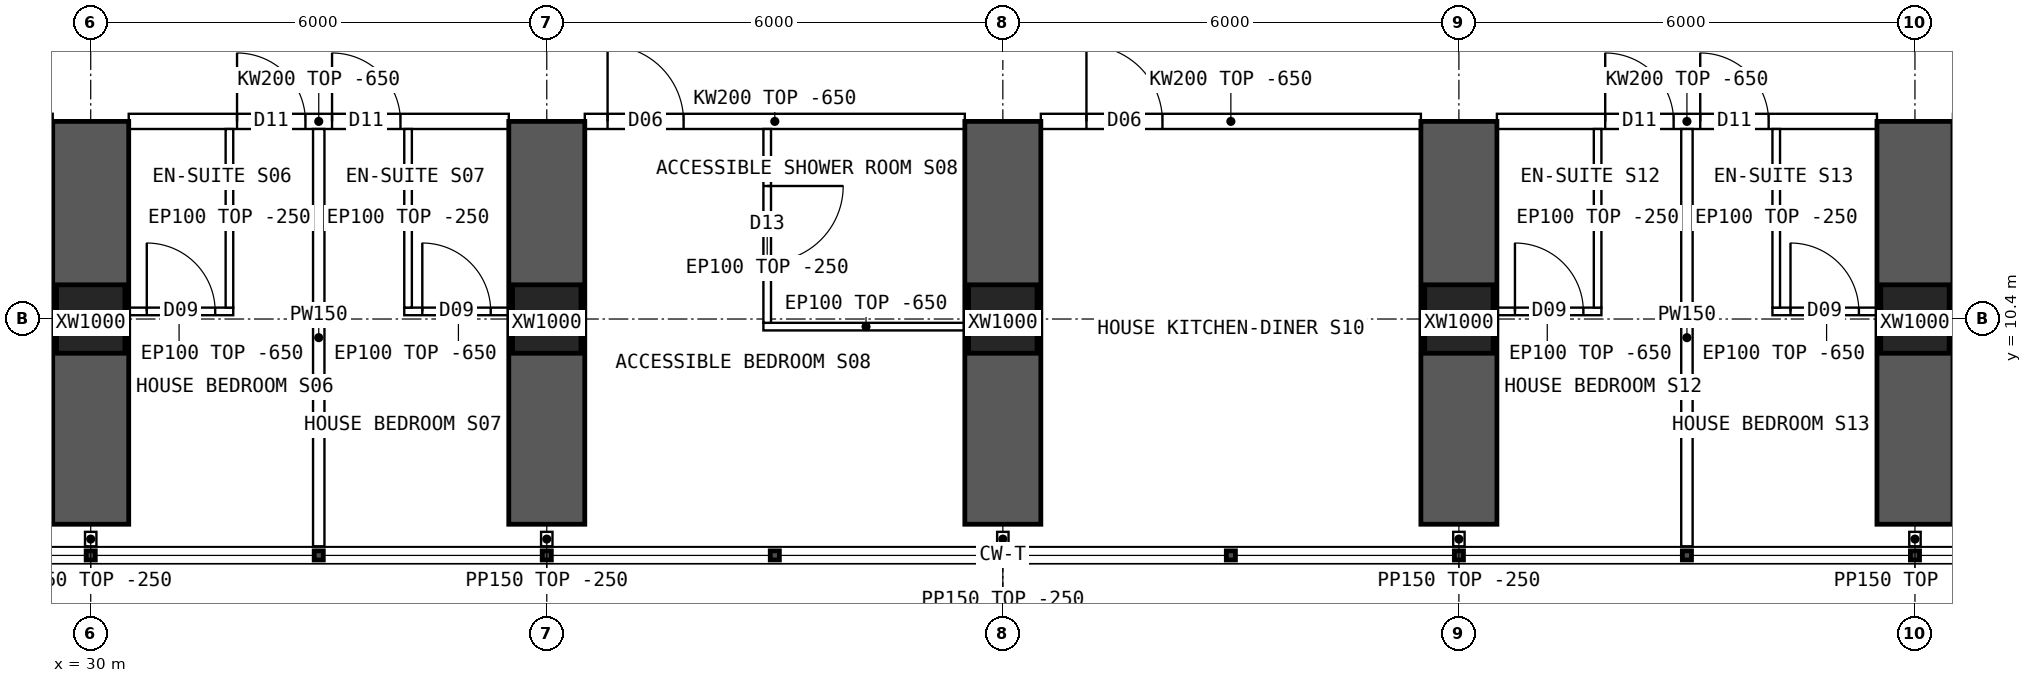
"""IFC4 building model, lengths in metres.
Left out: names, types, materials, properties, quantities, classifications, styles, units other than length and angle.
Written with IfcOpenShell. Run it as: python <this file> out.ifc"""

import sys

from ifc_helpers import new_model, si_unit, direction, frame, frame_2d, origin, origin_2d, place, context, subcontext, project, spatial, polyline, rectangle, hollow_rectangle, outline, extrude, element, fill, save


model = new_model("IFC4")
c1 = context("Model", 3, precision=1e-05, world=origin(), true_north=direction((0.0, 1.0)))
c2 = subcontext(c1, "Body", "Model", "MODEL_VIEW")
j1 = project(units=[si_unit("LENGTHUNIT", "METRE"), si_unit("PLANEANGLEUNIT", "RADIAN")], contexts=[c1])
p1 = place(None, origin())
s1 = spatial("IfcSite", under=j1, at=p1, CompositionType="ELEMENT")
p2 = place(p1, origin())
s2 = spatial("IfcBuilding", under=s1, at=p2, CompositionType="ELEMENT")
p3 = place(p2, frame((0.0, 0.0, 27.7)))
s3 = spatial("IfcBuildingStorey", under=s2, at=p3, CompositionType="ELEMENT", Elevation=27.7)
for number, where, z_axis, x_axis in (
    (1, (30.0, 10.4, 0.0), (0.0, 0.0, 1.0), (1.0, 0.0, 0.0)),
    (2, (36.0, 10.4, 0.0), (0.0, 0.0, 1.0), (1.0, 0.0, 0.0)),
    (3, (42.0, 10.4, 0.0), (0.0, 0.0, 1.0), (1.0, 0.0, 0.0)),
    (4, (48.0, 10.4, 0.0), (0.0, 0.0, 1.0), (1.0, 0.0, 0.0)),
    (5, (54.0, 10.4, 0.0), (0.0, 0.0, 1.0), (1.0, 0.0, 0.0)),
):
    element("IfcColumn", number, at=place(p3, frame(where, z_axis=z_axis, x_axis=x_axis)), inside=s3, PredefinedType="COLUMN", context=c2, shape_type="SweptSolid", body=[
        extrude(hollow_rectangle(XDim=0.9, YDim=0.9, WallThickness=0.09, at=origin_2d()), origin(), (0.0, 0.0, 1.0), 3.75),
    ])
for number, where, z_axis, x_axis in (
    (6, (30.0, 7.7, 0.0), (0.0, 0.0, 1.0), (0.0, 1.0, 0.0)),
    (7, (36.0, 7.7, 0.0), (0.0, 0.0, 1.0), (0.0, 1.0, 0.0)),
    (8, (42.0, 7.7, 0.0), (0.0, 0.0, 1.0), (0.0, 1.0, 0.0)),
    (9, (48.0, 7.7, 0.0), (0.0, 0.0, 1.0), (0.0, 1.0, 0.0)),
    (10, (54.0, 7.7, 0.0), (0.0, 0.0, 1.0), (0.0, 1.0, 0.0)),
):
    element("IfcWall", number, at=place(p3, frame(where, z_axis=z_axis, x_axis=x_axis)), inside=s3, PredefinedType="SHEAR", context=c2, shape_type="SweptSolid", body=[
        extrude(rectangle(XDim=5.3, YDim=1.0, at=frame_2d((2.65, 0.0))), origin(), (0.0, 0.0, 1.0), 3.75),
    ])
p4 = place(p3, frame((30.5, 13.0, 0.0), z_axis=(0.0, 0.0, 1.0), x_axis=(1.0, 0.0, 0.0)))
e11 = element("IfcWall", 11, at=p4, inside=s3, PredefinedType="SOLIDWALL", context=c2, shape_type="SweptSolid", body=[
    extrude(outline(polyline([(0.0, 0.0), (5.0, 0.0), (5.0, 3.1), (0.0, 3.1), (0.0, 0.0)])), frame((0.0, 0.1, 0.0), z_axis=(0.0, -1.0, 0.0), x_axis=(1.0, 0.0, 0.0)), (0.0, 0.0, 1.0), 0.2),
])
p5 = place(p4, frame((1.425, 0.0, 0.0)))
e12 = element("IfcOpeningElement", 12, at=p5, cuts=e11, PredefinedType="OPENING", context=c2, shape_type="SweptSolid", body=[
    extrude(rectangle(XDim=0.9, YDim=2.1, at=frame_2d((0.45, 1.05))), frame((0.0, 0.11, 0.0), z_axis=(0.0, -1.0, 0.0), x_axis=(1.0, 0.0, 0.0)), (0.0, 0.0, 1.0), 0.22),
])
p6 = place(p4, frame((2.675, 0.0, 0.0)))
e13 = element("IfcOpeningElement", 13, at=p6, cuts=e11, PredefinedType="OPENING", context=c2, shape_type="SweptSolid", body=[
    extrude(rectangle(XDim=0.9, YDim=2.1, at=frame_2d((0.45, 1.05))), frame((0.0, 0.11, 0.0), z_axis=(0.0, -1.0, 0.0), x_axis=(1.0, 0.0, 0.0)), (0.0, 0.0, 1.0), 0.22),
])
p7 = place(p3, frame((36.5, 13.0, 0.0), z_axis=(0.0, 0.0, 1.0), x_axis=(1.0, 0.0, 0.0)))
e14 = element("IfcWall", 14, at=p7, inside=s3, PredefinedType="SOLIDWALL", context=c2, shape_type="SweptSolid", body=[
    extrude(outline(polyline([(0.0, 0.0), (5.0, 0.0), (5.0, 3.1), (0.0, 3.1), (0.0, 0.0)])), frame((0.0, 0.1, 0.0), z_axis=(0.0, -1.0, 0.0), x_axis=(1.0, 0.0, 0.0)), (0.0, 0.0, 1.0), 0.2),
])
p8 = place(p7, frame((0.3, 0.0, 0.0)))
e15 = element("IfcOpeningElement", 15, at=p8, cuts=e14, PredefinedType="OPENING", context=c2, shape_type="SweptSolid", body=[
    extrude(rectangle(XDim=1.0, YDim=2.1, at=frame_2d((0.5, 1.05))), frame((0.0, 0.11, 0.0), z_axis=(0.0, -1.0, 0.0), x_axis=(1.0, 0.0, 0.0)), (0.0, 0.0, 1.0), 0.22),
])
p9 = place(p3, frame((42.5, 13.0, 0.0), z_axis=(0.0, 0.0, 1.0), x_axis=(1.0, 0.0, 0.0)))
e16 = element("IfcWall", 16, at=p9, inside=s3, PredefinedType="SOLIDWALL", context=c2, shape_type="SweptSolid", body=[
    extrude(outline(polyline([(0.0, 0.0), (5.0, 0.0), (5.0, 3.1), (0.0, 3.1), (0.0, 0.0)])), frame((0.0, 0.1, 0.0), z_axis=(0.0, -1.0, 0.0), x_axis=(1.0, 0.0, 0.0)), (0.0, 0.0, 1.0), 0.2),
])
p10 = place(p9, frame((0.6, 0.0, 0.0)))
e17 = element("IfcOpeningElement", 17, at=p10, cuts=e16, PredefinedType="OPENING", context=c2, shape_type="SweptSolid", body=[
    extrude(rectangle(XDim=1.0, YDim=2.1, at=frame_2d((0.5, 1.05))), frame((0.0, 0.11, 0.0), z_axis=(0.0, -1.0, 0.0), x_axis=(1.0, 0.0, 0.0)), (0.0, 0.0, 1.0), 0.22),
])
p11 = place(p3, frame((48.5, 13.0, 0.0), z_axis=(0.0, 0.0, 1.0), x_axis=(1.0, 0.0, 0.0)))
e18 = element("IfcWall", 18, at=p11, inside=s3, PredefinedType="SOLIDWALL", context=c2, shape_type="SweptSolid", body=[
    extrude(outline(polyline([(0.0, 0.0), (5.0, 0.0), (5.0, 3.1), (0.0, 3.1), (0.0, 0.0)])), frame((0.0, 0.1, 0.0), z_axis=(0.0, -1.0, 0.0), x_axis=(1.0, 0.0, 0.0)), (0.0, 0.0, 1.0), 0.2),
])
p12 = place(p11, frame((1.425, 0.0, 0.0)))
e19 = element("IfcOpeningElement", 19, at=p12, cuts=e18, PredefinedType="OPENING", context=c2, shape_type="SweptSolid", body=[
    extrude(rectangle(XDim=0.9, YDim=2.1, at=frame_2d((0.45, 1.05))), frame((0.0, 0.11, 0.0), z_axis=(0.0, -1.0, 0.0), x_axis=(1.0, 0.0, 0.0)), (0.0, 0.0, 1.0), 0.22),
])
p13 = place(p11, frame((2.675, 0.0, 0.0)))
e20 = element("IfcOpeningElement", 20, at=p13, cuts=e18, PredefinedType="OPENING", context=c2, shape_type="SweptSolid", body=[
    extrude(rectangle(XDim=0.9, YDim=2.1, at=frame_2d((0.45, 1.05))), frame((0.0, 0.11, 0.0), z_axis=(0.0, -1.0, 0.0), x_axis=(1.0, 0.0, 0.0)), (0.0, 0.0, 1.0), 0.22),
])
p14 = place(p3, frame((33.0, 7.41, 0.0), z_axis=(0.0, 0.0, 1.0), x_axis=(0.0, 1.0, 0.0)))
e21 = element("IfcWall", 21, at=p14, inside=s3, PredefinedType="PARTITIONING", context=c2, shape_type="SweptSolid", body=[
    extrude(outline(polyline([(0.0, 0.0), (5.49, 0.0), (5.49, 3.1), (5.442, 3.1), (5.44, 3.5), (3.192, 3.5), (3.19, 3.1), (2.792, 3.1), (2.79, 3.5), (0.0, 3.5), (0.0, 0.0)])), frame((0.0, 0.075, 0.0), z_axis=(0.0, -1.0, 0.0), x_axis=(1.0, 0.0, 0.0)), (0.0, 0.0, 1.0), 0.15),
])
p15 = place(p3, frame((31.875, 10.5, 0.0), z_axis=(0.0, 0.0, 1.0), x_axis=(-1.0, 0.0, 0.0)))
e22 = element("IfcWall", 22, at=p15, inside=s3, PredefinedType="PARTITIONING", context=c2, shape_type="SweptSolid", body=[
    extrude(outline(polyline([(0.0, 0.0), (1.425, 0.0), (1.425, 3.1), (0.0, 3.1), (0.0, 0.0)])), frame((0.0, 0.05, 0.0), z_axis=(0.0, -1.0, 0.0), x_axis=(1.0, 0.0, 0.0)), (0.0, 0.0, 1.0), 0.1),
])
p16 = place(p15, frame((0.238, 0.0, 0.0)))
e23 = element("IfcOpeningElement", 23, at=p16, cuts=e22, PredefinedType="OPENING", context=c2, shape_type="SweptSolid", body=[
    extrude(rectangle(XDim=0.9, YDim=2.1, at=frame_2d((0.45, 1.05))), frame((0.0, 0.06, 0.0), z_axis=(0.0, -1.0, 0.0), x_axis=(1.0, 0.0, 0.0)), (0.0, 0.0, 1.0), 0.12),
])
p17 = place(p3, frame((31.825, 10.55, 0.0), z_axis=(0.0, 0.0, 1.0), x_axis=(0.0, 1.0, 0.0)))
e24 = element("IfcWall", 24, at=p17, inside=s3, PredefinedType="PARTITIONING", context=c2, shape_type="SweptSolid", body=[
    extrude(outline(polyline([(0.0, 0.0), (2.35, 0.0), (2.35, 3.1), (2.302, 3.1), (2.3, 3.5), (0.052, 3.5), (0.05, 3.1), (0.0, 3.1), (0.0, 0.0)])), frame((0.0, 0.05, 0.0), z_axis=(0.0, -1.0, 0.0), x_axis=(1.0, 0.0, 0.0)), (0.0, 0.0, 1.0), 0.1),
])
p18 = place(p3, frame((35.55, 10.5, 0.0), z_axis=(0.0, 0.0, 1.0), x_axis=(-1.0, 0.0, 0.0)))
e25 = element("IfcWall", 25, at=p18, inside=s3, PredefinedType="PARTITIONING", context=c2, shape_type="SweptSolid", body=[
    extrude(outline(polyline([(0.0, 0.0), (1.425, 0.0), (1.425, 3.1), (0.0, 3.1), (0.0, 0.0)])), frame((0.0, 0.05, 0.0), z_axis=(0.0, -1.0, 0.0), x_axis=(1.0, 0.0, 0.0)), (0.0, 0.0, 1.0), 0.1),
])
p19 = place(p18, frame((0.288, 0.0, 0.0)))
e26 = element("IfcOpeningElement", 26, at=p19, cuts=e25, PredefinedType="OPENING", context=c2, shape_type="SweptSolid", body=[
    extrude(rectangle(XDim=0.9, YDim=2.1, at=frame_2d((0.45, 1.05))), frame((0.0, 0.06, 0.0), z_axis=(0.0, -1.0, 0.0), x_axis=(1.0, 0.0, 0.0)), (0.0, 0.0, 1.0), 0.12),
])
p20 = place(p3, frame((34.175, 10.55, 0.0), z_axis=(0.0, 0.0, 1.0), x_axis=(0.0, 1.0, 0.0)))
e27 = element("IfcWall", 27, at=p20, inside=s3, PredefinedType="PARTITIONING", context=c2, shape_type="SweptSolid", body=[
    extrude(outline(polyline([(0.0, 0.0), (2.35, 0.0), (2.35, 3.1), (2.302, 3.1), (2.3, 3.5), (0.052, 3.5), (0.05, 3.1), (0.0, 3.1), (0.0, 0.0)])), frame((0.0, 0.05, 0.0), z_axis=(0.0, -1.0, 0.0), x_axis=(1.0, 0.0, 0.0)), (0.0, 0.0, 1.0), 0.1),
])
p21 = place(p3, frame((38.85, 10.3, 0.0), z_axis=(0.0, 0.0, 1.0), x_axis=(1.0, 0.0, 0.0)))
e28 = element("IfcWall", 28, at=p21, inside=s3, PredefinedType="PARTITIONING", context=c2, shape_type="SweptSolid", body=[
    extrude(outline(polyline([(0.0, 0.0), (2.7, 0.0), (2.7, 3.1), (0.0, 3.1), (0.0, 0.0)])), frame((0.0, 0.05, 0.0), z_axis=(0.0, -1.0, 0.0), x_axis=(1.0, 0.0, 0.0)), (0.0, 0.0, 1.0), 0.1),
])
p22 = place(p3, frame((38.9, 10.35, 0.0), z_axis=(0.0, 0.0, 1.0), x_axis=(0.0, 1.0, 0.0)))
e29 = element("IfcWall", 29, at=p22, inside=s3, PredefinedType="PARTITIONING", context=c2, shape_type="SweptSolid", body=[
    extrude(outline(polyline([(0.0, 0.0), (2.55, 0.0), (2.55, 3.1), (2.502, 3.1), (2.5, 3.5), (0.252, 3.5), (0.25, 3.1), (0.0, 3.1), (0.0, 0.0)])), frame((0.0, 0.05, 0.0), z_axis=(0.0, -1.0, 0.0), x_axis=(1.0, 0.0, 0.0)), (0.0, 0.0, 1.0), 0.1),
])
p23 = place(p22, frame((0.8, 0.0, 0.0)))
e30 = element("IfcOpeningElement", 30, at=p23, cuts=e29, PredefinedType="OPENING", context=c2, shape_type="SweptSolid", body=[
    extrude(rectangle(XDim=1.0, YDim=2.1, at=frame_2d((0.5, 1.05))), frame((0.0, 0.06, 0.0), z_axis=(0.0, -1.0, 0.0), x_axis=(1.0, 0.0, 0.0)), (0.0, 0.0, 1.0), 0.12),
])
p24 = place(p3, frame((51.0, 7.41, 0.0), z_axis=(0.0, 0.0, 1.0), x_axis=(0.0, 1.0, 0.0)))
e31 = element("IfcWall", 31, at=p24, inside=s3, PredefinedType="PARTITIONING", context=c2, shape_type="SweptSolid", body=[
    extrude(outline(polyline([(0.0, 0.0), (5.49, 0.0), (5.49, 3.1), (5.442, 3.1), (5.44, 3.5), (3.192, 3.5), (3.19, 3.1), (2.792, 3.1), (2.79, 3.5), (0.0, 3.5), (0.0, 0.0)])), frame((0.0, 0.075, 0.0), z_axis=(0.0, -1.0, 0.0), x_axis=(1.0, 0.0, 0.0)), (0.0, 0.0, 1.0), 0.15),
])
p25 = place(p3, frame((49.875, 10.5, 0.0), z_axis=(0.0, 0.0, 1.0), x_axis=(-1.0, 0.0, 0.0)))
e32 = element("IfcWall", 32, at=p25, inside=s3, PredefinedType="PARTITIONING", context=c2, shape_type="SweptSolid", body=[
    extrude(outline(polyline([(0.0, 0.0), (1.425, 0.0), (1.425, 3.1), (0.0, 3.1), (0.0, 0.0)])), frame((0.0, 0.05, 0.0), z_axis=(0.0, -1.0, 0.0), x_axis=(1.0, 0.0, 0.0)), (0.0, 0.0, 1.0), 0.1),
])
p26 = place(p25, frame((0.238, 0.0, 0.0)))
e33 = element("IfcOpeningElement", 33, at=p26, cuts=e32, PredefinedType="OPENING", context=c2, shape_type="SweptSolid", body=[
    extrude(rectangle(XDim=0.9, YDim=2.1, at=frame_2d((0.45, 1.05))), frame((0.0, 0.06, 0.0), z_axis=(0.0, -1.0, 0.0), x_axis=(1.0, 0.0, 0.0)), (0.0, 0.0, 1.0), 0.12),
])
p27 = place(p3, frame((49.825, 10.55, 0.0), z_axis=(0.0, 0.0, 1.0), x_axis=(0.0, 1.0, 0.0)))
e34 = element("IfcWall", 34, at=p27, inside=s3, PredefinedType="PARTITIONING", context=c2, shape_type="SweptSolid", body=[
    extrude(outline(polyline([(0.0, 0.0), (2.35, 0.0), (2.35, 3.1), (2.302, 3.1), (2.3, 3.5), (0.052, 3.5), (0.05, 3.1), (0.0, 3.1), (0.0, 0.0)])), frame((0.0, 0.05, 0.0), z_axis=(0.0, -1.0, 0.0), x_axis=(1.0, 0.0, 0.0)), (0.0, 0.0, 1.0), 0.1),
])
p28 = place(p3, frame((53.55, 10.5, 0.0), z_axis=(0.0, 0.0, 1.0), x_axis=(-1.0, 0.0, 0.0)))
e35 = element("IfcWall", 35, at=p28, inside=s3, PredefinedType="PARTITIONING", context=c2, shape_type="SweptSolid", body=[
    extrude(outline(polyline([(0.0, 0.0), (1.425, 0.0), (1.425, 3.1), (0.0, 3.1), (0.0, 0.0)])), frame((0.0, 0.05, 0.0), z_axis=(0.0, -1.0, 0.0), x_axis=(1.0, 0.0, 0.0)), (0.0, 0.0, 1.0), 0.1),
])
p29 = place(p28, frame((0.288, 0.0, 0.0)))
e36 = element("IfcOpeningElement", 36, at=p29, cuts=e35, PredefinedType="OPENING", context=c2, shape_type="SweptSolid", body=[
    extrude(rectangle(XDim=0.9, YDim=2.1, at=frame_2d((0.45, 1.05))), frame((0.0, 0.06, 0.0), z_axis=(0.0, -1.0, 0.0), x_axis=(1.0, 0.0, 0.0)), (0.0, 0.0, 1.0), 0.12),
])
p30 = place(p3, frame((52.175, 10.55, 0.0), z_axis=(0.0, 0.0, 1.0), x_axis=(0.0, 1.0, 0.0)))
e37 = element("IfcWall", 37, at=p30, inside=s3, PredefinedType="PARTITIONING", context=c2, shape_type="SweptSolid", body=[
    extrude(outline(polyline([(0.0, 0.0), (2.35, 0.0), (2.35, 3.1), (2.302, 3.1), (2.3, 3.5), (0.052, 3.5), (0.05, 3.1), (0.0, 3.1), (0.0, 0.0)])), frame((0.0, 0.05, 0.0), z_axis=(0.0, -1.0, 0.0), x_axis=(1.0, 0.0, 0.0)), (0.0, 0.0, 1.0), 0.1),
])
for number, where, z_axis, x_axis in (
    (38, (30.0, 7.6, 0.0), (0.0, 0.0, 1.0), (0.0, -1.0, 0.0)),
    (39, (36.0, 7.6, 0.0), (0.0, 0.0, 1.0), (0.0, -1.0, 0.0)),
    (40, (42.0, 7.6, 0.0), (0.0, 0.0, 1.0), (0.0, -1.0, 0.0)),
    (41, (48.0, 7.6, 0.0), (0.0, 0.0, 1.0), (0.0, -1.0, 0.0)),
    (42, (54.0, 7.6, 0.0), (0.0, 0.0, 1.0), (0.0, -1.0, 0.0)),
):
    element("IfcWall", number, at=place(p3, frame(where, z_axis=z_axis, x_axis=x_axis)), inside=s3, PredefinedType="PARTITIONING", context=c2, shape_type="SweptSolid", body=[
        extrude(rectangle(XDim=0.19, YDim=0.15, at=frame_2d((0.095, 0.0))), origin(), (0.0, 0.0, 1.0), 3.5),
    ])
p31 = place(p16, origin())
e43 = element("IfcDoor", 43, at=p31, inside=s3, OperationType="SINGLE_SWING_RIGHT", PredefinedType="DOOR", context=c2, shape_type="SweptSolid", body=[
    extrude(rectangle(XDim=0.9, YDim=2.1, at=frame_2d((0.45, 1.05))), frame((0.0, 0.025, 0.0), z_axis=(0.0, -1.0, 0.0), x_axis=(1.0, 0.0, 0.0)), (0.0, 0.0, 1.0), 0.05),
])
fill(e23, e43)
p32 = place(p5, origin())
e44 = element("IfcDoor", 44, at=p32, inside=s3, OperationType="SINGLE_SWING_LEFT", PredefinedType="DOOR", context=c2, shape_type="SweptSolid", body=[
    extrude(rectangle(XDim=0.9, YDim=2.1, at=frame_2d((0.45, 1.05))), frame((0.0, 0.025, 0.0), z_axis=(0.0, -1.0, 0.0), x_axis=(1.0, 0.0, 0.0)), (0.0, 0.0, 1.0), 0.05),
])
fill(e12, e44)
p33 = place(p19, origin())
e45 = element("IfcDoor", 45, at=p33, inside=s3, OperationType="SINGLE_SWING_RIGHT", PredefinedType="DOOR", context=c2, shape_type="SweptSolid", body=[
    extrude(rectangle(XDim=0.9, YDim=2.1, at=frame_2d((0.45, 1.05))), frame((0.0, 0.025, 0.0), z_axis=(0.0, -1.0, 0.0), x_axis=(1.0, 0.0, 0.0)), (0.0, 0.0, 1.0), 0.05),
])
fill(e26, e45)
p34 = place(p6, origin())
e46 = element("IfcDoor", 46, at=p34, inside=s3, OperationType="SINGLE_SWING_LEFT", PredefinedType="DOOR", context=c2, shape_type="SweptSolid", body=[
    extrude(rectangle(XDim=0.9, YDim=2.1, at=frame_2d((0.45, 1.05))), frame((0.0, 0.025, 0.0), z_axis=(0.0, -1.0, 0.0), x_axis=(1.0, 0.0, 0.0)), (0.0, 0.0, 1.0), 0.05),
])
fill(e13, e46)
p35 = place(p23, origin())
e47 = element("IfcDoor", 47, at=p35, inside=s3, OperationType="SINGLE_SWING_RIGHT", PredefinedType="DOOR", context=c2, shape_type="SweptSolid", body=[
    extrude(rectangle(XDim=1.0, YDim=2.1, at=frame_2d((0.5, 1.05))), frame((0.0, 0.025, 0.0), z_axis=(0.0, -1.0, 0.0), x_axis=(1.0, 0.0, 0.0)), (0.0, 0.0, 1.0), 0.05),
])
fill(e30, e47)
p36 = place(p8, origin())
e48 = element("IfcDoor", 48, at=p36, inside=s3, OperationType="SINGLE_SWING_LEFT", PredefinedType="DOOR", context=c2, shape_type="SweptSolid", body=[
    extrude(rectangle(XDim=1.0, YDim=2.1, at=frame_2d((0.5, 1.05))), frame((0.0, 0.025, 0.0), z_axis=(0.0, -1.0, 0.0), x_axis=(1.0, 0.0, 0.0)), (0.0, 0.0, 1.0), 0.05),
])
fill(e15, e48)
p37 = place(p10, origin())
e49 = element("IfcDoor", 49, at=p37, inside=s3, OperationType="SINGLE_SWING_LEFT", PredefinedType="DOOR", context=c2, shape_type="SweptSolid", body=[
    extrude(rectangle(XDim=1.0, YDim=2.1, at=frame_2d((0.5, 1.05))), frame((0.0, 0.025, 0.0), z_axis=(0.0, -1.0, 0.0), x_axis=(1.0, 0.0, 0.0)), (0.0, 0.0, 1.0), 0.05),
])
fill(e17, e49)
p38 = place(p26, origin())
e50 = element("IfcDoor", 50, at=p38, inside=s3, OperationType="SINGLE_SWING_RIGHT", PredefinedType="DOOR", context=c2, shape_type="SweptSolid", body=[
    extrude(rectangle(XDim=0.9, YDim=2.1, at=frame_2d((0.45, 1.05))), frame((0.0, 0.025, 0.0), z_axis=(0.0, -1.0, 0.0), x_axis=(1.0, 0.0, 0.0)), (0.0, 0.0, 1.0), 0.05),
])
fill(e33, e50)
p39 = place(p12, origin())
e51 = element("IfcDoor", 51, at=p39, inside=s3, OperationType="SINGLE_SWING_LEFT", PredefinedType="DOOR", context=c2, shape_type="SweptSolid", body=[
    extrude(rectangle(XDim=0.9, YDim=2.1, at=frame_2d((0.45, 1.05))), frame((0.0, 0.025, 0.0), z_axis=(0.0, -1.0, 0.0), x_axis=(1.0, 0.0, 0.0)), (0.0, 0.0, 1.0), 0.05),
])
fill(e19, e51)
p40 = place(p29, origin())
e52 = element("IfcDoor", 52, at=p40, inside=s3, OperationType="SINGLE_SWING_RIGHT", PredefinedType="DOOR", context=c2, shape_type="SweptSolid", body=[
    extrude(rectangle(XDim=0.9, YDim=2.1, at=frame_2d((0.45, 1.05))), frame((0.0, 0.025, 0.0), z_axis=(0.0, -1.0, 0.0), x_axis=(1.0, 0.0, 0.0)), (0.0, 0.0, 1.0), 0.05),
])
fill(e36, e52)
p41 = place(p13, origin())
e53 = element("IfcDoor", 53, at=p41, inside=s3, OperationType="SINGLE_SWING_LEFT", PredefinedType="DOOR", context=c2, shape_type="SweptSolid", body=[
    extrude(rectangle(XDim=0.9, YDim=2.1, at=frame_2d((0.45, 1.05))), frame((0.0, 0.025, 0.0), z_axis=(0.0, -1.0, 0.0), x_axis=(1.0, 0.0, 0.0)), (0.0, 0.0, 1.0), 0.05),
])
fill(e20, e53)
save(model, sys.argv[1])
